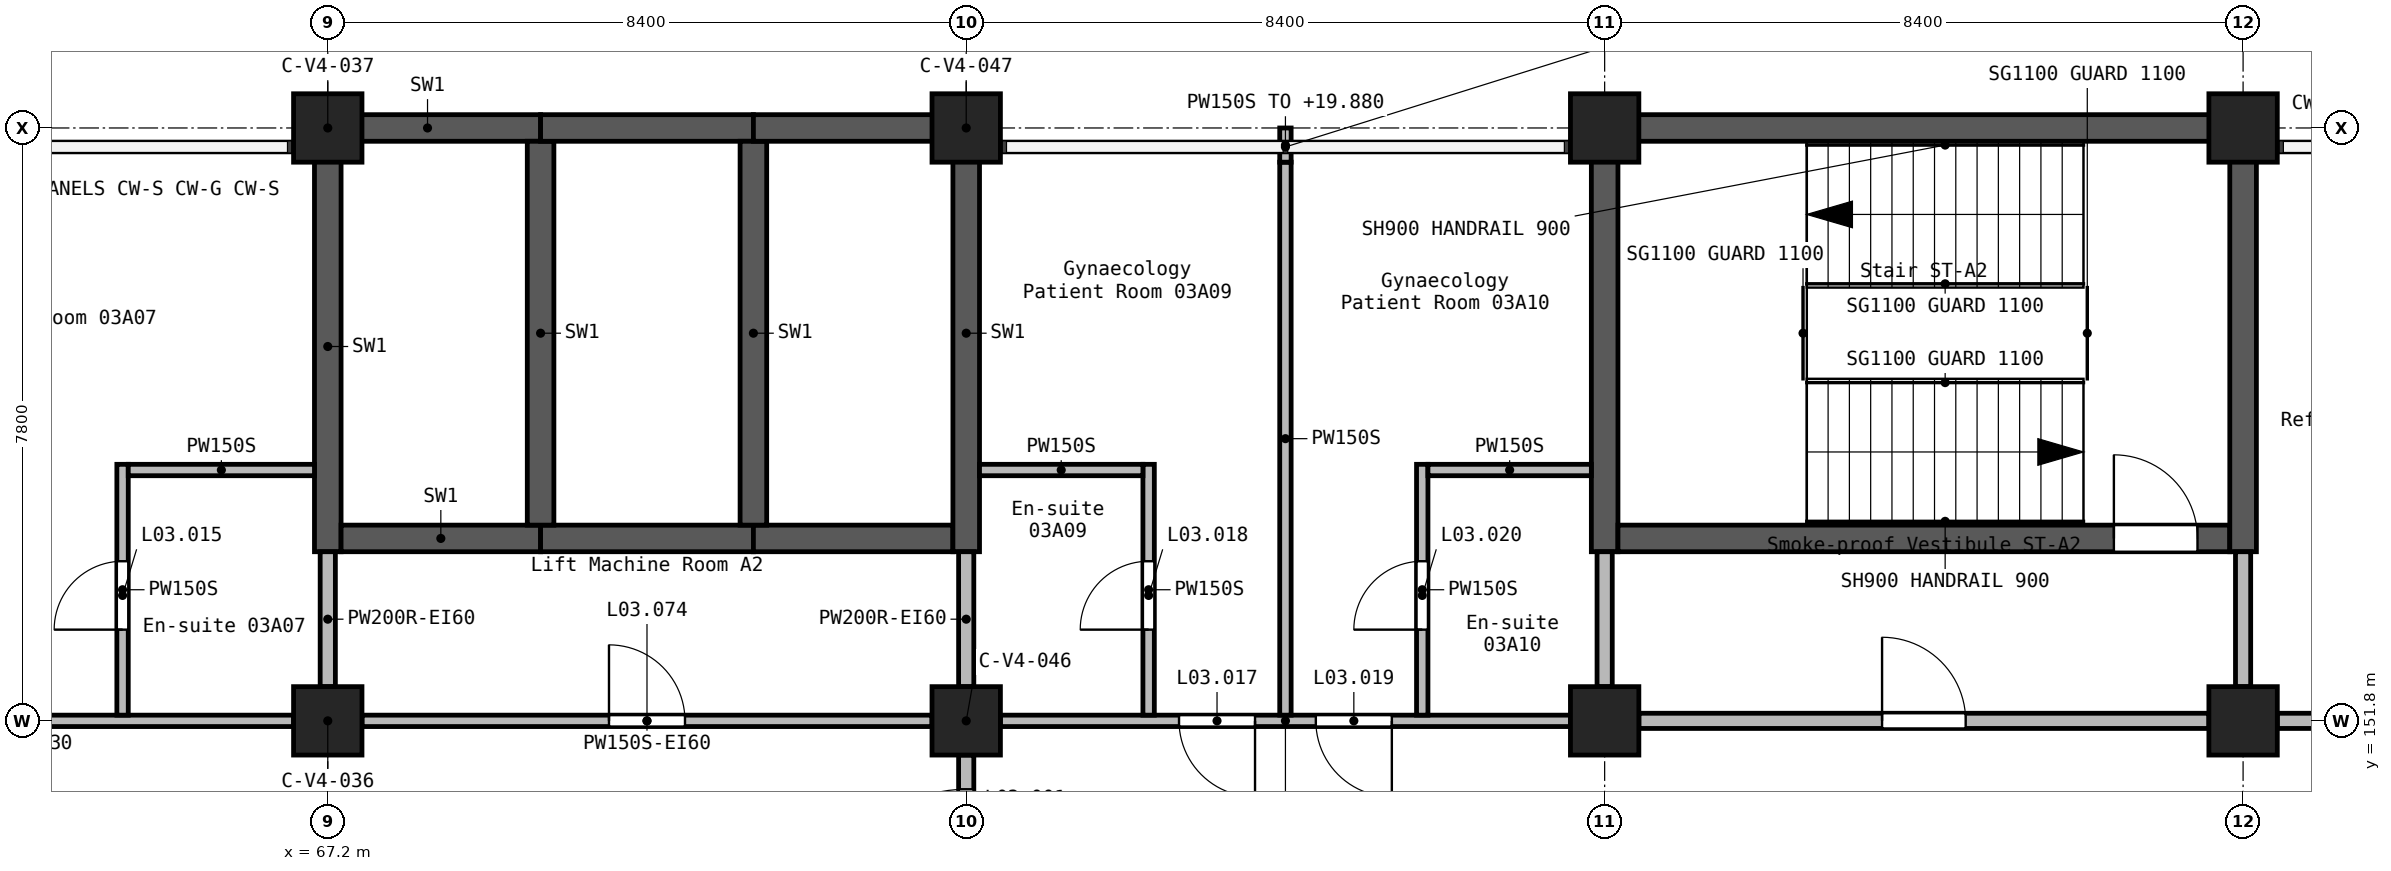
"""IFC4 building model, lengths in metres.
Left out: names, types, materials, properties, quantities, classifications, styles, units other than length and angle.
Written with IfcOpenShell. Run it as: python <this file> out.ifc"""

import sys

from ifc_helpers import new_model, si_unit, direction, frame, frame_2d, origin, origin_2d, place, context, subcontext, project, spatial, rectangle, extrude, element, fill, save


model = new_model("IFC4")
c1 = context("Model", 3, precision=1e-05, world=origin(), true_north=direction((0.0, 1.0)))
c2 = subcontext(c1, "Body", "Model", "MODEL_VIEW")
j1 = project(units=[si_unit("LENGTHUNIT", "METRE"), si_unit("PLANEANGLEUNIT", "RADIAN")], contexts=[c1])
p1 = place(None, origin())
s1 = spatial("IfcSite", under=j1, at=p1, CompositionType="ELEMENT")
p2 = place(p1, origin())
s2 = spatial("IfcBuilding", under=s1, at=p2, CompositionType="ELEMENT")
p3 = place(p2, frame((0.0, 0.0, 16.8)))
s3 = spatial("IfcBuildingStorey", under=s2, at=p3, CompositionType="ELEMENT", Elevation=16.8)
for number, where, z_axis, x_axis in (
    (1, (67.2, 151.8, 0.0), (0.0, 0.0, 1.0), (1.0, 0.0, 0.0)),
    (2, (67.2, 159.6, 0.0), (0.0, 0.0, 1.0), (1.0, 0.0, 0.0)),
    (3, (75.6, 151.8, 0.0), (0.0, 0.0, 1.0), (1.0, 0.0, 0.0)),
    (4, (75.6, 159.6, 0.0), (0.0, 0.0, 1.0), (1.0, 0.0, 0.0)),
    (5, (84.0, 151.8, 0.0), (0.0, 0.0, 1.0), (1.0, 0.0, 0.0)),
    (6, (84.0, 159.6, 0.0), (0.0, 0.0, 1.0), (1.0, 0.0, 0.0)),
    (7, (92.4, 151.8, 0.0), (0.0, 0.0, 1.0), (1.0, 0.0, 0.0)),
    (8, (92.4, 159.6, 0.0), (0.0, 0.0, 1.0), (1.0, 0.0, 0.0)),
):
    element("IfcColumn", number, at=place(p3, frame(where, z_axis=z_axis, x_axis=x_axis)), inside=s3, PredefinedType="COLUMN", context=c2, shape_type="SweptSolid", body=[
        extrude(rectangle(XDim=0.9, YDim=0.9, at=origin_2d()), origin(), (0.0, 0.0, 1.0), 4.2),
    ])
p4 = place(p3, frame((83.825, 159.6, 0.0), z_axis=(0.0, 0.0, 1.0), x_axis=(1.0, 0.0, 0.0)))
e9 = element("IfcWall", 9, at=p4, inside=s3, PredefinedType="SHEAR", context=c2, shape_type="SweptSolid", body=[
    extrude(rectangle(XDim=8.4, YDim=0.35, at=frame_2d((4.2, 0.0))), origin(), (0.0, 0.0, 1.0), 4.2),
])
p5 = place(p3, frame((84.0, 154.025, 0.0), z_axis=(0.0, 0.0, 1.0), x_axis=(0.0, 1.0, 0.0)))
e10 = element("IfcWall", 10, at=p5, inside=s3, PredefinedType="SHEAR", context=c2, shape_type="SweptSolid", body=[
    extrude(rectangle(XDim=5.4, YDim=0.35, at=frame_2d((2.7, 0.0))), origin(), (0.0, 0.0, 1.0), 4.2),
])
p6 = place(p3, frame((84.175, 154.2, 0.0), z_axis=(0.0, 0.0, 1.0), x_axis=(1.0, 0.0, 0.0)))
e11 = element("IfcWall", 11, at=p6, inside=s3, PredefinedType="SHEAR", context=c2, shape_type="SweptSolid", body=[
    extrude(rectangle(XDim=8.05, YDim=0.35, at=frame_2d((4.025, 0.0))), origin(), (0.0, 0.0, 1.0), 4.2),
])
p7 = place(p6, frame((6.525, 0.0, 0.0)))
e12 = element("IfcOpeningElement", 12, at=p7, cuts=e11, PredefinedType="OPENING", context=c2, shape_type="SweptSolid", body=[
    extrude(rectangle(XDim=1.1, YDim=2.1, at=frame_2d((0.55, 1.05))), frame((0.0, 0.185, 0.0), z_axis=(0.0, -1.0, 0.0), x_axis=(1.0, 0.0, 0.0)), (0.0, 0.0, 1.0), 0.37),
])
p8 = place(p3, frame((92.4, 154.025, 0.0), z_axis=(0.0, 0.0, 1.0), x_axis=(0.0, 1.0, 0.0)))
e13 = element("IfcWall", 13, at=p8, inside=s3, PredefinedType="SHEAR", context=c2, shape_type="SweptSolid", body=[
    extrude(rectangle(XDim=5.75, YDim=0.35, at=frame_2d((2.875, 0.0))), origin(), (0.0, 0.0, 1.0), 4.2),
])
p9 = place(p3, frame((67.025, 159.6, 0.0), z_axis=(0.0, 0.0, 1.0), x_axis=(1.0, 0.0, 0.0)))
e14 = element("IfcWall", 14, at=p9, inside=s3, PredefinedType="SHEAR", context=c2, shape_type="SweptSolid", body=[
    extrude(rectangle(XDim=2.975, YDim=0.35, at=frame_2d((1.488, 0.0))), origin(), (0.0, 0.0, 1.0), 3.9),
])
p10 = place(p3, frame((67.2, 154.025, 0.0), z_axis=(0.0, 0.0, 1.0), x_axis=(0.0, 1.0, 0.0)))
e15 = element("IfcWall", 15, at=p10, inside=s3, PredefinedType="SHEAR", context=c2, shape_type="SweptSolid", body=[
    extrude(rectangle(XDim=5.4, YDim=0.35, at=frame_2d((2.7, 0.0))), origin(), (0.0, 0.0, 1.0), 3.9),
])
p11 = place(p3, frame((67.375, 154.2, 0.0), z_axis=(0.0, 0.0, 1.0), x_axis=(1.0, 0.0, 0.0)))
e16 = element("IfcWall", 16, at=p11, inside=s3, PredefinedType="SHEAR", context=c2, shape_type="SweptSolid", body=[
    extrude(rectangle(XDim=2.625, YDim=0.35, at=frame_2d((1.312, 0.0))), origin(), (0.0, 0.0, 1.0), 3.9),
])
p12 = place(p3, frame((70.0, 154.2, 0.0), z_axis=(0.0, 0.0, 1.0), x_axis=(1.0, 0.0, 0.0)))
e17 = element("IfcWall", 17, at=p12, inside=s3, PredefinedType="SHEAR", context=c2, shape_type="SweptSolid", body=[
    extrude(rectangle(XDim=2.8, YDim=0.35, at=frame_2d((1.4, 0.0))), origin(), (0.0, 0.0, 1.0), 3.9),
])
p13 = place(p3, frame((70.0, 154.375, 0.0), z_axis=(0.0, 0.0, 1.0), x_axis=(0.0, 1.0, 0.0)))
e18 = element("IfcWall", 18, at=p13, inside=s3, PredefinedType="SHEAR", context=c2, shape_type="SweptSolid", body=[
    extrude(rectangle(XDim=5.05, YDim=0.35, at=frame_2d((2.525, 0.0))), origin(), (0.0, 0.0, 1.0), 3.9),
])
p14 = place(p3, frame((70.0, 159.6, 0.0), z_axis=(0.0, 0.0, 1.0), x_axis=(1.0, 0.0, 0.0)))
e19 = element("IfcWall", 19, at=p14, inside=s3, PredefinedType="SHEAR", context=c2, shape_type="SweptSolid", body=[
    extrude(rectangle(XDim=2.8, YDim=0.35, at=frame_2d((1.4, 0.0))), origin(), (0.0, 0.0, 1.0), 3.9),
])
p15 = place(p3, frame((72.8, 154.2, 0.0), z_axis=(0.0, 0.0, 1.0), x_axis=(1.0, 0.0, 0.0)))
e20 = element("IfcWall", 20, at=p15, inside=s3, PredefinedType="SHEAR", context=c2, shape_type="SweptSolid", body=[
    extrude(rectangle(XDim=2.625, YDim=0.35, at=frame_2d((1.312, 0.0))), origin(), (0.0, 0.0, 1.0), 3.9),
])
p16 = place(p3, frame((72.8, 154.375, 0.0), z_axis=(0.0, 0.0, 1.0), x_axis=(0.0, 1.0, 0.0)))
e21 = element("IfcWall", 21, at=p16, inside=s3, PredefinedType="SHEAR", context=c2, shape_type="SweptSolid", body=[
    extrude(rectangle(XDim=5.05, YDim=0.35, at=frame_2d((2.525, 0.0))), origin(), (0.0, 0.0, 1.0), 3.9),
])
p17 = place(p3, frame((72.8, 159.6, 0.0), z_axis=(0.0, 0.0, 1.0), x_axis=(1.0, 0.0, 0.0)))
e22 = element("IfcWall", 22, at=p17, inside=s3, PredefinedType="SHEAR", context=c2, shape_type="SweptSolid", body=[
    extrude(rectangle(XDim=2.625, YDim=0.35, at=frame_2d((1.312, 0.0))), origin(), (0.0, 0.0, 1.0), 3.9),
])
p18 = place(p3, frame((75.6, 154.025, 0.0), z_axis=(0.0, 0.0, 1.0), x_axis=(0.0, 1.0, 0.0)))
e23 = element("IfcWall", 23, at=p18, inside=s3, PredefinedType="SHEAR", context=c2, shape_type="SweptSolid", body=[
    extrude(rectangle(XDim=5.75, YDim=0.35, at=frame_2d((2.875, 0.0))), origin(), (0.0, 0.0, 1.0), 3.9),
])
p19 = place(p3, frame((84.45, 151.8, 0.0), z_axis=(0.0, 0.0, 1.0), x_axis=(1.0, 0.0, 0.0)))
e24 = element("IfcWall", 24, at=p19, inside=s3, PredefinedType="SOLIDWALL", context=c2, shape_type="SweptSolid", body=[
    extrude(rectangle(XDim=7.5, YDim=0.2, at=frame_2d((3.75, 0.0))), origin(), (0.0, 0.0, 1.0), 3.9),
])
p20 = place(p19, frame((3.2, 0.0, 0.0)))
e25 = element("IfcOpeningElement", 25, at=p20, cuts=e24, PredefinedType="OPENING", context=c2, shape_type="SweptSolid", body=[
    extrude(rectangle(XDim=1.1, YDim=2.1, at=frame_2d((0.55, 1.05))), frame((0.0, 0.11, 0.0), z_axis=(0.0, -1.0, 0.0), x_axis=(1.0, 0.0, 0.0)), (0.0, 0.0, 1.0), 0.22),
])
p21 = place(p3, frame((92.85, 151.8, 0.0), z_axis=(0.0, 0.0, 1.0), x_axis=(1.0, 0.0, 0.0)))
e26 = element("IfcWall", 26, at=p21, inside=s3, PredefinedType="SOLIDWALL", context=c2, shape_type="SweptSolid", body=[
    extrude(rectangle(XDim=3.85, YDim=0.2, at=frame_2d((1.925, 0.0))), origin(), (0.0, 0.0, 1.0), 3.9),
])
p22 = place(p21, frame((1.15, 0.0, 0.0)))
e27 = element("IfcOpeningElement", 27, at=p22, cuts=e26, PredefinedType="OPENING", context=c2, shape_type="SweptSolid", body=[
    extrude(rectangle(XDim=1.0, YDim=2.1, at=frame_2d((0.5, 1.05))), frame((0.0, 0.11, 0.0), z_axis=(0.0, -1.0, 0.0), x_axis=(1.0, 0.0, 0.0)), (0.0, 0.0, 1.0), 0.22),
])
p23 = place(p3, frame((92.4, 152.25, 0.0), z_axis=(0.0, 0.0, 1.0), x_axis=(0.0, 1.0, 0.0)))
e28 = element("IfcWall", 28, at=p23, inside=s3, PredefinedType="SOLIDWALL", context=c2, shape_type="SweptSolid", body=[
    extrude(rectangle(XDim=1.775, YDim=0.2, at=frame_2d((0.887, 0.0))), origin(), (0.0, 0.0, 1.0), 3.9),
])
p24 = place(p3, frame((75.6, 148.65, 0.0), z_axis=(0.0, 0.0, 1.0), x_axis=(0.0, 1.0, 0.0)))
e29 = element("IfcWall", 29, at=p24, inside=s3, PredefinedType="SOLIDWALL", context=c2, shape_type="SweptSolid", body=[
    extrude(rectangle(XDim=2.7, YDim=0.2, at=frame_2d((1.35, 0.0))), origin(), (0.0, 0.0, 1.0), 3.9),
])
p25 = place(p24, frame((0.45, 0.0, 0.0)))
e30 = element("IfcOpeningElement", 30, at=p25, cuts=e29, PredefinedType="OPENING", context=c2, shape_type="SweptSolid", body=[
    extrude(rectangle(XDim=1.8, YDim=2.1, at=frame_2d((0.9, 1.05))), frame((0.0, 0.11, 0.0), z_axis=(0.0, -1.0, 0.0), x_axis=(1.0, 0.0, 0.0)), (0.0, 0.0, 1.0), 0.22),
])
for number, where, z_axis, x_axis in (
    (31, (67.2, 152.25, 0.0), (0.0, 0.0, 1.0), (0.0, 1.0, 0.0)),
    (32, (75.6, 152.25, 0.0), (0.0, 0.0, 1.0), (0.0, 1.0, 0.0)),
    (33, (84.0, 152.25, 0.0), (0.0, 0.0, 1.0), (0.0, 1.0, 0.0)),
):
    element("IfcWall", number, at=place(p3, frame(where, z_axis=z_axis, x_axis=x_axis)), inside=s3, PredefinedType="SOLIDWALL", context=c2, shape_type="SweptSolid", body=[
        extrude(rectangle(XDim=1.775, YDim=0.2, at=frame_2d((0.887, 0.0))), origin(), (0.0, 0.0, 1.0), 3.9),
    ])
p26 = place(p3, frame((59.25, 151.8, 0.0), z_axis=(0.0, 0.0, 1.0), x_axis=(1.0, 0.0, 0.0)))
e34 = element("IfcWall", 34, at=p26, inside=s3, PredefinedType="PARTITIONING", context=c2, shape_type="SweptSolid", body=[
    extrude(rectangle(XDim=7.5, YDim=0.15, at=frame_2d((3.75, 0.0))), origin(), (0.0, 0.0, 1.0), 3.9),
])
p27 = place(p26, frame((1.9, 0.0, 0.0)))
e35 = element("IfcOpeningElement", 35, at=p27, cuts=e34, PredefinedType="OPENING", context=c2, shape_type="SweptSolid", body=[
    extrude(rectangle(XDim=1.0, YDim=2.1, at=frame_2d((0.5, 1.05))), frame((0.0, 0.085, 0.0), z_axis=(0.0, -1.0, 0.0), x_axis=(1.0, 0.0, 0.0)), (0.0, 0.0, 1.0), 0.17),
])
p28 = place(p3, frame((83.55, 151.8, 0.0), z_axis=(0.0, 0.0, 1.0), x_axis=(-1.0, 0.0, 0.0)))
e36 = element("IfcWall", 36, at=p28, inside=s3, PredefinedType="PARTITIONING", context=c2, shape_type="SweptSolid", body=[
    extrude(rectangle(XDim=7.5, YDim=0.15, at=frame_2d((3.75, 0.0))), origin(), (0.0, 0.0, 1.0), 3.9),
])
p29 = place(p28, frame((4.15, 0.0, 0.0)))
e37 = element("IfcOpeningElement", 37, at=p29, cuts=e36, PredefinedType="OPENING", context=c2, shape_type="SweptSolid", body=[
    extrude(rectangle(XDim=1.0, YDim=2.1, at=frame_2d((0.5, 1.05))), frame((0.0, 0.085, 0.0), z_axis=(0.0, -1.0, 0.0), x_axis=(1.0, 0.0, 0.0)), (0.0, 0.0, 1.0), 0.17),
])
p30 = place(p28, frame((2.35, 0.0, 0.0)))
e38 = element("IfcOpeningElement", 38, at=p30, cuts=e36, PredefinedType="OPENING", context=c2, shape_type="SweptSolid", body=[
    extrude(rectangle(XDim=1.0, YDim=2.1, at=frame_2d((0.5, 1.05))), frame((0.0, 0.085, 0.0), z_axis=(0.0, -1.0, 0.0), x_axis=(1.0, 0.0, 0.0)), (0.0, 0.0, 1.0), 0.17),
])
p31 = place(p3, frame((67.65, 151.8, 0.0), z_axis=(0.0, 0.0, 1.0), x_axis=(1.0, 0.0, 0.0)))
e39 = element("IfcWall", 39, at=p31, inside=s3, PredefinedType="PARTITIONING", context=c2, shape_type="SweptSolid", body=[
    extrude(rectangle(XDim=7.5, YDim=0.15, at=frame_2d((3.75, 0.0))), origin(), (0.0, 0.0, 1.0), 3.9),
])
p32 = place(p31, frame((3.25, 0.0, 0.0)))
e40 = element("IfcOpeningElement", 40, at=p32, cuts=e39, PredefinedType="OPENING", context=c2, shape_type="SweptSolid", body=[
    extrude(rectangle(XDim=1.0, YDim=2.1, at=frame_2d((0.5, 1.05))), frame((0.0, 0.085, 0.0), z_axis=(0.0, -1.0, 0.0), x_axis=(1.0, 0.0, 0.0)), (0.0, 0.0, 1.0), 0.17),
])
p33 = place(p3, frame((79.8, 151.875, 0.0), z_axis=(0.0, 0.0, 1.0), x_axis=(0.0, 1.0, 0.0)))
e41 = element("IfcWall", 41, at=p33, inside=s3, PredefinedType="PARTITIONING", context=c2, shape_type="SweptSolid", body=[
    extrude(rectangle(XDim=7.275, YDim=0.15, at=frame_2d((3.637, 0.0))), origin(), (0.0, 0.0, 1.0), 3.9),
])
p34 = place(p3, frame((79.8, 159.15, 0.0), z_axis=(0.0, 0.0, 1.0), x_axis=(0.0, 1.0, 0.0)))
e42 = element("IfcWall", 42, at=p34, inside=s3, PredefinedType="PARTITIONING", context=c2, shape_type="SweptSolid", body=[
    extrude(rectangle(XDim=0.45, YDim=0.15, at=frame_2d((0.225, 0.0))), origin(), (0.0, 0.0, 1.0), 3.08),
])
p35 = place(p3, frame((64.5, 151.875, 0.0), z_axis=(0.0, 0.0, 1.0), x_axis=(0.0, 1.0, 0.0)))
e43 = element("IfcWall", 43, at=p35, inside=s3, PredefinedType="PARTITIONING", context=c2, shape_type="SweptSolid", body=[
    extrude(rectangle(XDim=3.3, YDim=0.15, at=frame_2d((1.65, 0.0))), origin(), (0.0, 0.0, 1.0), 3.9),
])
p36 = place(p35, frame((1.125, 0.0, 0.0)))
e44 = element("IfcOpeningElement", 44, at=p36, cuts=e43, PredefinedType="OPENING", context=c2, shape_type="SweptSolid", body=[
    extrude(rectangle(XDim=0.9, YDim=2.1, at=frame_2d((0.45, 1.05))), frame((0.0, 0.085, 0.0), z_axis=(0.0, -1.0, 0.0), x_axis=(1.0, 0.0, 0.0)), (0.0, 0.0, 1.0), 0.17),
])
p37 = place(p3, frame((78.0, 151.875, 0.0), z_axis=(0.0, 0.0, 1.0), x_axis=(0.0, 1.0, 0.0)))
e45 = element("IfcWall", 45, at=p37, inside=s3, PredefinedType="PARTITIONING", context=c2, shape_type="SweptSolid", body=[
    extrude(rectangle(XDim=3.3, YDim=0.15, at=frame_2d((1.65, 0.0))), origin(), (0.0, 0.0, 1.0), 3.9),
])
p38 = place(p37, frame((1.125, 0.0, 0.0)))
e46 = element("IfcOpeningElement", 46, at=p38, cuts=e45, PredefinedType="OPENING", context=c2, shape_type="SweptSolid", body=[
    extrude(rectangle(XDim=0.9, YDim=2.1, at=frame_2d((0.45, 1.05))), frame((0.0, 0.085, 0.0), z_axis=(0.0, -1.0, 0.0), x_axis=(1.0, 0.0, 0.0)), (0.0, 0.0, 1.0), 0.17),
])
p39 = place(p3, frame((81.6, 151.875, 0.0), z_axis=(0.0, 0.0, 1.0), x_axis=(0.0, 1.0, 0.0)))
e47 = element("IfcWall", 47, at=p39, inside=s3, PredefinedType="PARTITIONING", context=c2, shape_type="SweptSolid", body=[
    extrude(rectangle(XDim=3.3, YDim=0.15, at=frame_2d((1.65, 0.0))), origin(), (0.0, 0.0, 1.0), 3.9),
])
p40 = place(p39, frame((1.125, 0.0, 0.0)))
e48 = element("IfcOpeningElement", 48, at=p40, cuts=e47, PredefinedType="OPENING", context=c2, shape_type="SweptSolid", body=[
    extrude(rectangle(XDim=0.9, YDim=2.1, at=frame_2d((0.45, 1.05))), frame((0.0, 0.085, 0.0), z_axis=(0.0, -1.0, 0.0), x_axis=(1.0, 0.0, 0.0)), (0.0, 0.0, 1.0), 0.17),
])
p41 = place(p3, frame((64.575, 155.1, 0.0), z_axis=(0.0, 0.0, 1.0), x_axis=(1.0, 0.0, 0.0)))
e49 = element("IfcWall", 49, at=p41, inside=s3, PredefinedType="PARTITIONING", context=c2, shape_type="SweptSolid", body=[
    extrude(rectangle(XDim=2.45, YDim=0.15, at=frame_2d((1.225, 0.0))), origin(), (0.0, 0.0, 1.0), 3.9),
])
p42 = place(p3, frame((75.775, 155.1, 0.0), z_axis=(0.0, 0.0, 1.0), x_axis=(1.0, 0.0, 0.0)))
e50 = element("IfcWall", 50, at=p42, inside=s3, PredefinedType="PARTITIONING", context=c2, shape_type="SweptSolid", body=[
    extrude(rectangle(XDim=2.15, YDim=0.15, at=frame_2d((1.075, 0.0))), origin(), (0.0, 0.0, 1.0), 3.9),
])
p43 = place(p3, frame((81.675, 155.1, 0.0), z_axis=(0.0, 0.0, 1.0), x_axis=(1.0, 0.0, 0.0)))
e51 = element("IfcWall", 51, at=p43, inside=s3, PredefinedType="PARTITIONING", context=c2, shape_type="SweptSolid", body=[
    extrude(rectangle(XDim=2.15, YDim=0.15, at=frame_2d((1.075, 0.0))), origin(), (0.0, 0.0, 1.0), 3.9),
])
p44 = place(p25, frame((1.8, 0.0, 0.0), z_axis=(0.0, 0.0, 1.0), x_axis=(-1.0, 0.0, 0.0)))
e52 = element("IfcDoor", 52, at=p44, inside=s3, OperationType="DOUBLE_DOOR_SINGLE_SWING", PredefinedType="DOOR", context=c2, shape_type="SweptSolid", body=[
    extrude(rectangle(XDim=1.8, YDim=2.1, at=frame_2d((0.9, 1.05))), frame((0.0, 0.025, 0.0), z_axis=(0.0, -1.0, 0.0), x_axis=(1.0, 0.0, 0.0)), (0.0, 0.0, 1.0), 0.05),
])
fill(e30, e52)
p45 = place(p36, frame((0.9, 0.0, 0.0), z_axis=(0.0, 0.0, 1.0), x_axis=(-1.0, 0.0, 0.0)))
e53 = element("IfcDoor", 53, at=p45, inside=s3, OperationType="SINGLE_SWING_RIGHT", PredefinedType="DOOR", context=c2, shape_type="SweptSolid", body=[
    extrude(rectangle(XDim=0.9, YDim=2.1, at=frame_2d((0.45, 1.05))), frame((0.0, 0.025, 0.0), z_axis=(0.0, -1.0, 0.0), x_axis=(1.0, 0.0, 0.0)), (0.0, 0.0, 1.0), 0.05),
])
fill(e44, e53)
p46 = place(p29, frame((1.0, 0.0, 0.0), z_axis=(0.0, 0.0, 1.0), x_axis=(-1.0, 0.0, 0.0)))
e54 = element("IfcDoor", 54, at=p46, inside=s3, OperationType="SINGLE_SWING_LEFT", PredefinedType="DOOR", context=c2, shape_type="SweptSolid", body=[
    extrude(rectangle(XDim=1.0, YDim=2.1, at=frame_2d((0.5, 1.05))), frame((0.0, 0.025, 0.0), z_axis=(0.0, -1.0, 0.0), x_axis=(1.0, 0.0, 0.0)), (0.0, 0.0, 1.0), 0.05),
])
fill(e37, e54)
p47 = place(p38, origin())
e55 = element("IfcDoor", 55, at=p47, inside=s3, OperationType="SINGLE_SWING_LEFT", PredefinedType="DOOR", context=c2, shape_type="SweptSolid", body=[
    extrude(rectangle(XDim=0.9, YDim=2.1, at=frame_2d((0.45, 1.05))), frame((0.0, 0.025, 0.0), z_axis=(0.0, -1.0, 0.0), x_axis=(1.0, 0.0, 0.0)), (0.0, 0.0, 1.0), 0.05),
])
fill(e46, e55)
p48 = place(p30, frame((1.0, 0.0, 0.0), z_axis=(0.0, 0.0, 1.0), x_axis=(-1.0, 0.0, 0.0)))
e56 = element("IfcDoor", 56, at=p48, inside=s3, OperationType="SINGLE_SWING_RIGHT", PredefinedType="DOOR", context=c2, shape_type="SweptSolid", body=[
    extrude(rectangle(XDim=1.0, YDim=2.1, at=frame_2d((0.5, 1.05))), frame((0.0, 0.025, 0.0), z_axis=(0.0, -1.0, 0.0), x_axis=(1.0, 0.0, 0.0)), (0.0, 0.0, 1.0), 0.05),
])
fill(e38, e56)
p49 = place(p40, frame((0.9, 0.0, 0.0), z_axis=(0.0, 0.0, 1.0), x_axis=(-1.0, 0.0, 0.0)))
e57 = element("IfcDoor", 57, at=p49, inside=s3, OperationType="SINGLE_SWING_RIGHT", PredefinedType="DOOR", context=c2, shape_type="SweptSolid", body=[
    extrude(rectangle(XDim=0.9, YDim=2.1, at=frame_2d((0.45, 1.05))), frame((0.0, 0.025, 0.0), z_axis=(0.0, -1.0, 0.0), x_axis=(1.0, 0.0, 0.0)), (0.0, 0.0, 1.0), 0.05),
])
fill(e48, e57)
p50 = place(p32, origin())
e58 = element("IfcDoor", 58, at=p50, inside=s3, OperationType="SINGLE_SWING_LEFT", PredefinedType="DOOR", context=c2, shape_type="SweptSolid", body=[
    extrude(rectangle(XDim=1.0, YDim=2.1, at=frame_2d((0.5, 1.05))), frame((0.0, 0.025, 0.0), z_axis=(0.0, -1.0, 0.0), x_axis=(1.0, 0.0, 0.0)), (0.0, 0.0, 1.0), 0.05),
])
fill(e40, e58)
p51 = place(p7, origin())
e59 = element("IfcDoor", 59, at=p51, inside=s3, OperationType="SINGLE_SWING_RIGHT", PredefinedType="DOOR", context=c2, shape_type="SweptSolid", body=[
    extrude(rectangle(XDim=1.1, YDim=2.1, at=frame_2d((0.55, 1.05))), frame((0.0, 0.025, 0.0), z_axis=(0.0, -1.0, 0.0), x_axis=(1.0, 0.0, 0.0)), (0.0, 0.0, 1.0), 0.05),
])
fill(e12, e59)
p52 = place(p20, origin())
e60 = element("IfcDoor", 60, at=p52, inside=s3, OperationType="SINGLE_SWING_RIGHT", PredefinedType="DOOR", context=c2, shape_type="SweptSolid", body=[
    extrude(rectangle(XDim=1.1, YDim=2.1, at=frame_2d((0.55, 1.05))), frame((0.0, 0.025, 0.0), z_axis=(0.0, -1.0, 0.0), x_axis=(1.0, 0.0, 0.0)), (0.0, 0.0, 1.0), 0.05),
])
fill(e25, e60)
save(model, sys.argv[1])
